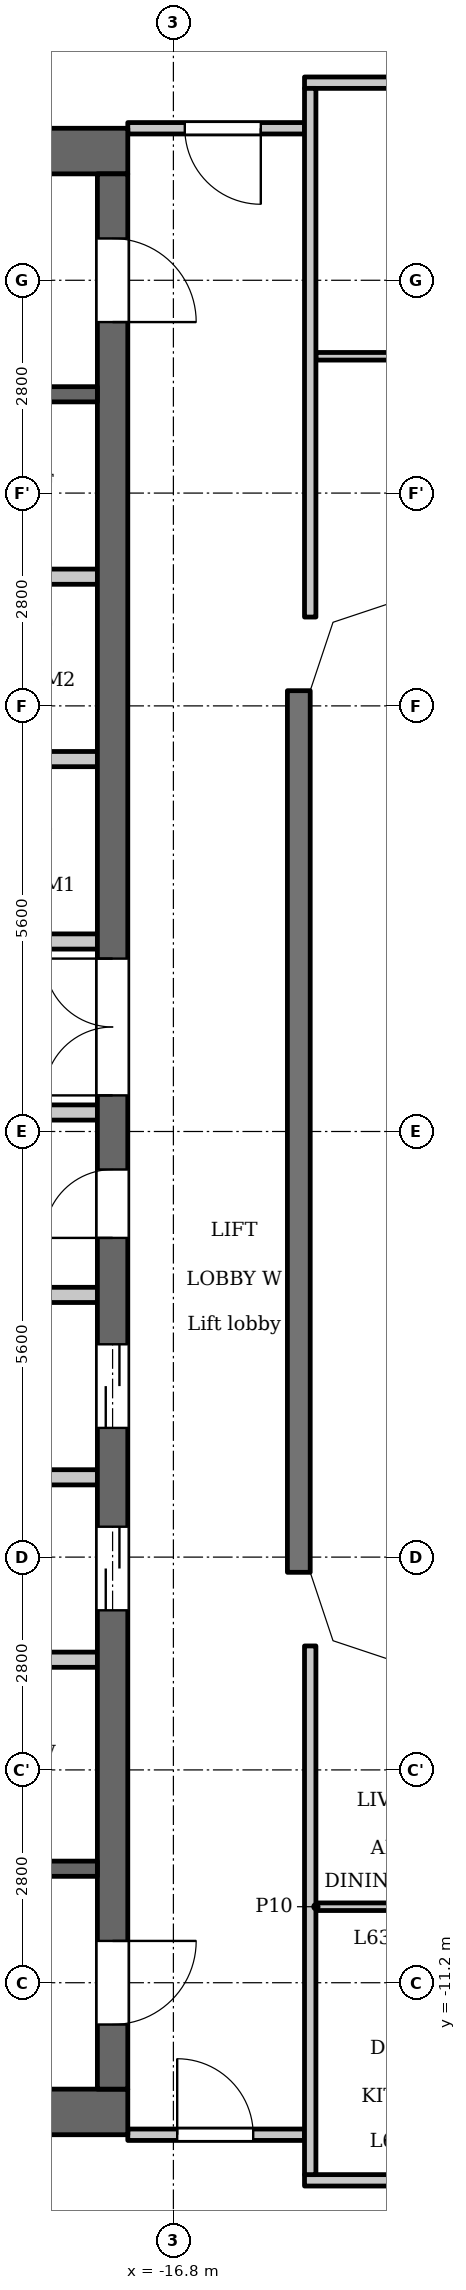
"""IFC4 building model, lengths in metres.
Left out: names, types, materials, properties, quantities, classifications, styles, units other than length and angle.
Written with IfcOpenShell. Run it as: python <this file> out.ifc"""

import sys

from ifc_helpers import new_model, si_unit, direction, frame, frame_2d, origin, place, context, subcontext, project, spatial, polyline, rectangle, outline, extrude, element, fill, save


model = new_model("IFC4")
c1 = context("Model", 3, precision=1e-05, world=origin(), true_north=direction((0.0, 1.0)))
c2 = subcontext(c1, "Body", "Model", "MODEL_VIEW")
j1 = project(units=[si_unit("LENGTHUNIT", "METRE"), si_unit("PLANEANGLEUNIT", "RADIAN")], contexts=[c1])
p1 = place(None, origin())
s1 = spatial("IfcSite", under=j1, at=p1, CompositionType="ELEMENT")
p2 = place(p1, origin())
s2 = spatial("IfcBuilding", under=s1, at=p2, CompositionType="ELEMENT")
p3 = place(p2, frame((0.0, 0.0, 245.2)))
s3 = spatial("IfcBuildingStorey", under=s2, at=p3, CompositionType="ELEMENT", Elevation=245.2)
p4 = place(p3, frame((-15.15, -5.8, 0.0), z_axis=(0.0, 0.0, 1.0), x_axis=(0.0, 1.0, 0.0)))
e1 = element("IfcWall", 1, at=p4, inside=s3, PredefinedType="SOLIDWALL", context=c2, shape_type="SweptSolid", body=[
    extrude(rectangle(XDim=11.6, YDim=0.3, at=frame_2d((5.8, 0.0))), origin(), (0.0, 0.0, 1.0), 3.2),
])
for number, where, z_axis, x_axis in (
    (2, (-17.4, 12.9, 0.0), (0.0, 0.0, 1.0), (-1.0, 0.0, 0.0)),
    (3, (-17.4, -12.9, 0.0), (0.0, 0.0, 1.0), (-1.0, 0.0, 0.0)),
):
    element("IfcWall", number, at=place(p3, frame(where, z_axis=z_axis, x_axis=x_axis)), inside=s3, PredefinedType="SHEAR", context=c2, shape_type="SweptSolid", body=[
        extrude(rectangle(XDim=7.32, YDim=0.6, at=frame_2d((3.66, 0.0))), origin(), (0.0, 0.0, 1.0), 3.2),
    ])
p5 = place(p3, frame((-17.6, -12.6, 0.0), z_axis=(0.0, 0.0, 1.0), x_axis=(0.0, 1.0, 0.0)))
e4 = element("IfcWall", 4, at=p5, inside=s3, PredefinedType="SHEAR", context=c2, shape_type="SweptSolid", body=[
    extrude(rectangle(XDim=25.2, YDim=0.4, at=frame_2d((12.6, 0.0))), origin(), (0.0, 0.0, 1.0), 3.2),
])
p6 = place(p5, frame((6.3, 0.0, 0.0)))
e5 = element("IfcOpeningElement", 5, at=p6, cuts=e4, PredefinedType="OPENING", context=c2, shape_type="SweptSolid", body=[
    extrude(rectangle(XDim=1.1, YDim=2.1, at=frame_2d((0.55, 1.05))), frame((0.0, 0.21, 0.0), z_axis=(0.0, -1.0, 0.0), x_axis=(1.0, 0.0, 0.0)), (0.0, 0.0, 1.0), 0.42),
])
p7 = place(p5, frame((8.7, 0.0, 0.0)))
e6 = element("IfcOpeningElement", 6, at=p7, cuts=e4, PredefinedType="OPENING", context=c2, shape_type="SweptSolid", body=[
    extrude(rectangle(XDim=1.1, YDim=2.1, at=frame_2d((0.55, 1.05))), frame((0.0, 0.21, 0.0), z_axis=(0.0, -1.0, 0.0), x_axis=(1.0, 0.0, 0.0)), (0.0, 0.0, 1.0), 0.42),
])
p8 = place(p5, frame((11.2, 0.0, 0.0)))
e7 = element("IfcOpeningElement", 7, at=p8, cuts=e4, PredefinedType="OPENING", context=c2, shape_type="SweptSolid", body=[
    extrude(rectangle(XDim=0.9, YDim=2.1, at=frame_2d((0.45, 1.05))), frame((0.0, 0.21, 0.0), z_axis=(0.0, -1.0, 0.0), x_axis=(1.0, 0.0, 0.0)), (0.0, 0.0, 1.0), 0.42),
])
p9 = place(p5, frame((23.25, 0.0, 0.0)))
e8 = element("IfcOpeningElement", 8, at=p9, cuts=e4, PredefinedType="OPENING", context=c2, shape_type="SweptSolid", body=[
    extrude(rectangle(XDim=1.1, YDim=2.1, at=frame_2d((0.55, 1.05))), frame((0.0, 0.21, 0.0), z_axis=(0.0, -1.0, 0.0), x_axis=(1.0, 0.0, 0.0)), (0.0, 0.0, 1.0), 0.42),
])
p10 = place(p5, frame((0.85, 0.0, 0.0)))
e9 = element("IfcOpeningElement", 9, at=p10, cuts=e4, PredefinedType="OPENING", context=c2, shape_type="SweptSolid", body=[
    extrude(rectangle(XDim=1.1, YDim=2.1, at=frame_2d((0.55, 1.05))), frame((0.0, 0.21, 0.0), z_axis=(0.0, -1.0, 0.0), x_axis=(1.0, 0.0, 0.0)), (0.0, 0.0, 1.0), 0.42),
])
p11 = place(p5, frame((13.075, 0.0, 0.0)))
e10 = element("IfcOpeningElement", 10, at=p11, cuts=e4, PredefinedType="OPENING", context=c2, shape_type="SweptSolid", body=[
    extrude(rectangle(XDim=1.8, YDim=2.1, at=frame_2d((0.9, 1.05))), frame((0.0, 0.21, 0.0), z_axis=(0.0, -1.0, 0.0), x_axis=(1.0, 0.0, 0.0)), (0.0, 0.0, 1.0), 0.42),
])
p12 = place(p3, frame((-17.8, -9.7, 0.0), z_axis=(0.0, 0.0, 1.0), x_axis=(-1.0, 0.0, 0.0)))
e11 = element("IfcWall", 11, at=p12, inside=s3, PredefinedType="SHEAR", context=c2, shape_type="SweptSolid", body=[
    extrude(rectangle(XDim=5.8, YDim=0.2, at=frame_2d((2.9, 0.0))), origin(), (0.0, 0.0, 1.0), 3.2),
])
p13 = place(p12, frame((0.85, 0.0, 0.0)))
e12 = element("IfcOpeningElement", 12, at=p13, cuts=e11, PredefinedType="OPENING", context=c2, shape_type="SweptSolid", body=[
    extrude(rectangle(XDim=1.1, YDim=2.1, at=frame_2d((0.55, 1.05))), frame((0.0, 0.11, 0.0), z_axis=(0.0, -1.0, 0.0), x_axis=(1.0, 0.0, 0.0)), (0.0, 0.0, 1.0), 0.22),
])
p14 = place(p12, frame((3.75, 0.0, 0.0)))
e13 = element("IfcOpeningElement", 13, at=p14, cuts=e11, PredefinedType="OPENING", context=c2, shape_type="SweptSolid", body=[
    extrude(rectangle(XDim=1.1, YDim=2.1, at=frame_2d((0.55, 1.05))), frame((0.0, 0.11, 0.0), z_axis=(0.0, -1.0, 0.0), x_axis=(1.0, 0.0, 0.0)), (0.0, 0.0, 1.0), 0.22),
])
for number, where, z_axis, x_axis in (
    (14, (-17.8, -6.95, 0.0), (0.0, 0.0, 1.0), (-1.0, 0.0, 0.0)),
    (15, (-17.8, -4.55, 0.0), (0.0, 0.0, 1.0), (-1.0, 0.0, 0.0)),
    (16, (-17.8, -2.15, 0.0), (0.0, 0.0, 1.0), (-1.0, 0.0, 0.0)),
):
    element("IfcWall", number, at=place(p3, frame(where, z_axis=z_axis, x_axis=x_axis)), inside=s3, PredefinedType="PARTITIONING", context=c2, shape_type="SweptSolid", body=[
        extrude(rectangle(XDim=2.8, YDim=0.2, at=frame_2d((1.4, 0.0))), origin(), (0.0, 0.0, 1.0), 3.2),
    ])
for number, where, z_axis, x_axis in (
    (17, (-17.8, 0.25, 0.0), (0.0, 0.0, 1.0), (-1.0, 0.0, 0.0)),
    (18, (-17.8, 2.5, 0.0), (0.0, 0.0, 1.0), (-1.0, 0.0, 0.0)),
):
    element("IfcWall", number, at=place(p3, frame(where, z_axis=z_axis, x_axis=x_axis)), inside=s3, PredefinedType="PARTITIONING", context=c2, shape_type="SweptSolid", body=[
        extrude(rectangle(XDim=3.0, YDim=0.2, at=frame_2d((1.5, 0.0))), origin(), (0.0, 0.0, 1.0), 3.2),
    ])
for number, where, z_axis, x_axis in (
    (19, (-17.8, 4.9, 0.0), (0.0, 0.0, 1.0), (-1.0, 0.0, 0.0)),
    (20, (-17.8, 7.3, 0.0), (0.0, 0.0, 1.0), (-1.0, 0.0, 0.0)),
):
    element("IfcWall", number, at=place(p3, frame(where, z_axis=z_axis, x_axis=x_axis)), inside=s3, PredefinedType="PARTITIONING", context=c2, shape_type="SweptSolid", body=[
        extrude(rectangle(XDim=2.8, YDim=0.2, at=frame_2d((1.4, 0.0))), origin(), (0.0, 0.0, 1.0), 3.2),
    ])
p15 = place(p3, frame((-17.8, 9.7, 0.0), z_axis=(0.0, 0.0, 1.0), x_axis=(-1.0, 0.0, 0.0)))
e21 = element("IfcWall", 21, at=p15, inside=s3, PredefinedType="SHEAR", context=c2, shape_type="SweptSolid", body=[
    extrude(rectangle(XDim=5.8, YDim=0.2, at=frame_2d((2.9, 0.0))), origin(), (0.0, 0.0, 1.0), 3.2),
])
p16 = place(p15, frame((0.85, 0.0, 0.0)))
e22 = element("IfcOpeningElement", 22, at=p16, cuts=e21, PredefinedType="OPENING", context=c2, shape_type="SweptSolid", body=[
    extrude(rectangle(XDim=1.1, YDim=2.1, at=frame_2d((0.55, 1.05))), frame((0.0, 0.11, 0.0), z_axis=(0.0, -1.0, 0.0), x_axis=(1.0, 0.0, 0.0)), (0.0, 0.0, 1.0), 0.22),
])
p17 = place(p15, frame((3.75, 0.0, 0.0)))
e23 = element("IfcOpeningElement", 23, at=p17, cuts=e21, PredefinedType="OPENING", context=c2, shape_type="SweptSolid", body=[
    extrude(rectangle(XDim=1.1, YDim=2.1, at=frame_2d((0.55, 1.05))), frame((0.0, 0.11, 0.0), z_axis=(0.0, -1.0, 0.0), x_axis=(1.0, 0.0, 0.0)), (0.0, 0.0, 1.0), 0.22),
])
p18 = place(p3, frame((-15.075, -13.8, 0.0), z_axis=(0.0, 0.0, 1.0), x_axis=(1.0, 0.0, 0.0)))
e24 = element("IfcWall", 24, at=p18, inside=s3, PredefinedType="PARTITIONING", context=c2, shape_type="SweptSolid", body=[
    extrude(rectangle(XDim=30.15, YDim=0.15, at=frame_2d((15.075, 0.0))), origin(), (0.0, 0.0, 1.0), 3.2),
])
p19 = place(p18, frame((2.225, 0.0, 0.0)))
e25 = element("IfcOpeningElement", 25, at=p19, cuts=e24, PredefinedType="OPENING", context=c2, shape_type="SweptSolid", body=[
    extrude(rectangle(XDim=1.0, YDim=2.1, at=frame_2d((0.5, 1.05))), frame((0.0, 0.085, 0.0), z_axis=(0.0, -1.0, 0.0), x_axis=(1.0, 0.0, 0.0)), (0.0, 0.0, 1.0), 0.17),
])
p20 = place(p18, frame((13.425, 0.0, 0.0)))
e26 = element("IfcOpeningElement", 26, at=p20, cuts=e24, PredefinedType="OPENING", context=c2, shape_type="SweptSolid", body=[
    extrude(rectangle(XDim=1.0, YDim=2.1, at=frame_2d((0.5, 1.05))), frame((0.0, 0.085, 0.0), z_axis=(0.0, -1.0, 0.0), x_axis=(1.0, 0.0, 0.0)), (0.0, 0.0, 1.0), 0.17),
])
p21 = place(p18, frame((24.625, 0.0, 0.0)))
e27 = element("IfcOpeningElement", 27, at=p21, cuts=e24, PredefinedType="OPENING", context=c2, shape_type="SweptSolid", body=[
    extrude(rectangle(XDim=1.0, YDim=2.1, at=frame_2d((0.5, 1.05))), frame((0.0, 0.085, 0.0), z_axis=(0.0, -1.0, 0.0), x_axis=(1.0, 0.0, 0.0)), (0.0, 0.0, 1.0), 0.17),
])
p22 = place(p3, frame((-17.4, -13.2, 0.0), z_axis=(0.0, 0.0, 1.0), x_axis=(1.0, 0.0, 0.0)))
e28 = element("IfcWall", 28, at=p22, inside=s3, PredefinedType="PARTITIONING", context=c2, shape_type="SweptSolid", body=[
    extrude(rectangle(XDim=2.325, YDim=0.15, at=frame_2d((1.163, 0.0))), origin(), (0.0, 0.0, 1.0), 3.2),
])
p23 = place(p22, frame((0.65, 0.0, 0.0)))
e29 = element("IfcOpeningElement", 29, at=p23, cuts=e28, PredefinedType="OPENING", context=c2, shape_type="SweptSolid", body=[
    extrude(rectangle(XDim=1.0, YDim=2.1, at=frame_2d((0.5, 1.05))), frame((0.0, 0.085, 0.0), z_axis=(0.0, -1.0, 0.0), x_axis=(1.0, 0.0, 0.0)), (0.0, 0.0, 1.0), 0.17),
])
p24 = place(p3, frame((-14.925, -10.2, 0.0), z_axis=(0.0, 0.0, 1.0), x_axis=(1.0, 0.0, 0.0)))
e30 = element("IfcWall", 30, at=p24, inside=s3, PredefinedType="PARTITIONING", context=c2, shape_type="SweptSolid", body=[
    extrude(rectangle(XDim=29.85, YDim=0.1, at=frame_2d((14.925, 0.0))), origin(), (0.0, 0.0, 1.0), 3.2),
])
p25 = place(p24, frame((7.875, 0.0, 0.0)))
e31 = element("IfcOpeningElement", 31, at=p25, cuts=e30, PredefinedType="OPENING", context=c2, shape_type="SweptSolid", body=[
    extrude(rectangle(XDim=0.8, YDim=2.1, at=frame_2d((0.4, 1.05))), frame((0.0, 0.06, 0.0), z_axis=(0.0, -1.0, 0.0), x_axis=(1.0, 0.0, 0.0)), (0.0, 0.0, 1.0), 0.12),
])
p26 = place(p24, frame((2.175, 0.0, 0.0)))
e32 = element("IfcOpeningElement", 32, at=p26, cuts=e30, PredefinedType="OPENING", context=c2, shape_type="SweptSolid", body=[
    extrude(rectangle(XDim=0.9, YDim=2.1, at=frame_2d((0.45, 1.05))), frame((0.0, 0.06, 0.0), z_axis=(0.0, -1.0, 0.0), x_axis=(1.0, 0.0, 0.0)), (0.0, 0.0, 1.0), 0.12),
])
p27 = place(p24, frame((19.075, 0.0, 0.0)))
e33 = element("IfcOpeningElement", 33, at=p27, cuts=e30, PredefinedType="OPENING", context=c2, shape_type="SweptSolid", body=[
    extrude(rectangle(XDim=0.8, YDim=2.1, at=frame_2d((0.4, 1.05))), frame((0.0, 0.06, 0.0), z_axis=(0.0, -1.0, 0.0), x_axis=(1.0, 0.0, 0.0)), (0.0, 0.0, 1.0), 0.12),
])
p28 = place(p24, frame((13.375, 0.0, 0.0)))
e34 = element("IfcOpeningElement", 34, at=p28, cuts=e30, PredefinedType="OPENING", context=c2, shape_type="SweptSolid", body=[
    extrude(rectangle(XDim=0.9, YDim=2.1, at=frame_2d((0.45, 1.05))), frame((0.0, 0.06, 0.0), z_axis=(0.0, -1.0, 0.0), x_axis=(1.0, 0.0, 0.0)), (0.0, 0.0, 1.0), 0.12),
])
p29 = place(p24, frame((28.525, 0.0, 0.0)))
e35 = element("IfcOpeningElement", 35, at=p29, cuts=e30, PredefinedType="OPENING", context=c2, shape_type="SweptSolid", body=[
    extrude(rectangle(XDim=0.8, YDim=2.1, at=frame_2d((0.4, 1.05))), frame((0.0, 0.06, 0.0), z_axis=(0.0, -1.0, 0.0), x_axis=(1.0, 0.0, 0.0)), (0.0, 0.0, 1.0), 0.12),
])
p30 = place(p24, frame((24.575, 0.0, 0.0)))
e36 = element("IfcOpeningElement", 36, at=p30, cuts=e30, PredefinedType="OPENING", context=c2, shape_type="SweptSolid", body=[
    extrude(rectangle(XDim=0.9, YDim=2.1, at=frame_2d((0.45, 1.05))), frame((0.0, 0.06, 0.0), z_axis=(0.0, -1.0, 0.0), x_axis=(1.0, 0.0, 0.0)), (0.0, 0.0, 1.0), 0.12),
])
p31 = place(p3, frame((-14.925, 10.2, 0.0), z_axis=(0.0, 0.0, 1.0), x_axis=(1.0, 0.0, 0.0)))
e37 = element("IfcWall", 37, at=p31, inside=s3, PredefinedType="PARTITIONING", context=c2, shape_type="SweptSolid", body=[
    extrude(rectangle(XDim=29.85, YDim=0.1, at=frame_2d((14.925, 0.0))), origin(), (0.0, 0.0, 1.0), 3.2),
])
p32 = place(p31, frame((13.475, 0.0, 0.0)))
e38 = element("IfcOpeningElement", 38, at=p32, cuts=e37, PredefinedType="OPENING", context=c2, shape_type="SweptSolid", body=[
    extrude(rectangle(XDim=0.9, YDim=2.1, at=frame_2d((0.45, 1.05))), frame((0.0, 0.06, 0.0), z_axis=(0.0, -1.0, 0.0), x_axis=(1.0, 0.0, 0.0)), (0.0, 0.0, 1.0), 0.12),
])
p33 = place(p31, frame((4.375, 0.0, 0.0)))
e39 = element("IfcOpeningElement", 39, at=p33, cuts=e37, PredefinedType="OPENING", context=c2, shape_type="SweptSolid", body=[
    extrude(rectangle(XDim=0.9, YDim=2.1, at=frame_2d((0.45, 1.05))), frame((0.0, 0.06, 0.0), z_axis=(0.0, -1.0, 0.0), x_axis=(1.0, 0.0, 0.0)), (0.0, 0.0, 1.0), 0.12),
])
p34 = place(p31, frame((15.475, 0.0, 0.0)))
e40 = element("IfcOpeningElement", 40, at=p34, cuts=e37, PredefinedType="OPENING", context=c2, shape_type="SweptSolid", body=[
    extrude(rectangle(XDim=0.8, YDim=2.1, at=frame_2d((0.4, 1.05))), frame((0.0, 0.06, 0.0), z_axis=(0.0, -1.0, 0.0), x_axis=(1.0, 0.0, 0.0)), (0.0, 0.0, 1.0), 0.12),
])
p35 = place(p31, frame((18.825, 0.0, 0.0)))
e41 = element("IfcOpeningElement", 41, at=p35, cuts=e37, PredefinedType="OPENING", context=c2, shape_type="SweptSolid", body=[
    extrude(rectangle(XDim=0.9, YDim=2.1, at=frame_2d((0.45, 1.05))), frame((0.0, 0.06, 0.0), z_axis=(0.0, -1.0, 0.0), x_axis=(1.0, 0.0, 0.0)), (0.0, 0.0, 1.0), 0.12),
])
p36 = place(p31, frame((28.474, 0.0, 0.0)))
e42 = element("IfcOpeningElement", 42, at=p36, cuts=e37, PredefinedType="OPENING", context=c2, shape_type="SweptSolid", body=[
    extrude(rectangle(XDim=0.8, YDim=2.1, at=frame_2d((0.4, 1.05))), frame((0.0, 0.06, 0.0), z_axis=(0.0, -1.0, 0.0), x_axis=(1.0, 0.0, 0.0)), (0.0, 0.0, 1.0), 0.12),
])
p37 = place(p31, frame((24.675, 0.0, 0.0)))
e43 = element("IfcOpeningElement", 43, at=p37, cuts=e37, PredefinedType="OPENING", context=c2, shape_type="SweptSolid", body=[
    extrude(rectangle(XDim=0.9, YDim=2.1, at=frame_2d((0.45, 1.05))), frame((0.0, 0.06, 0.0), z_axis=(0.0, -1.0, 0.0), x_axis=(1.0, 0.0, 0.0)), (0.0, 0.0, 1.0), 0.12),
])
p38 = place(p3, frame((-17.4, 13.2, 0.0), z_axis=(0.0, 0.0, 1.0), x_axis=(1.0, 0.0, 0.0)))
e44 = element("IfcWall", 44, at=p38, inside=s3, PredefinedType="PARTITIONING", context=c2, shape_type="SweptSolid", body=[
    extrude(rectangle(XDim=2.325, YDim=0.15, at=frame_2d((1.163, 0.0))), origin(), (0.0, 0.0, 1.0), 3.2),
])
p39 = place(p38, frame((0.75, 0.0, 0.0)))
e45 = element("IfcOpeningElement", 45, at=p39, cuts=e44, PredefinedType="OPENING", context=c2, shape_type="SweptSolid", body=[
    extrude(rectangle(XDim=1.0, YDim=2.1, at=frame_2d((0.5, 1.05))), frame((0.0, 0.085, 0.0), z_axis=(0.0, -1.0, 0.0), x_axis=(1.0, 0.0, 0.0)), (0.0, 0.0, 1.0), 0.17),
])
p40 = place(p3, frame((-15.075, 13.8, 0.0), z_axis=(0.0, 0.0, 1.0), x_axis=(1.0, 0.0, 0.0)))
e46 = element("IfcWall", 46, at=p40, inside=s3, PredefinedType="PARTITIONING", context=c2, shape_type="SweptSolid", body=[
    extrude(rectangle(XDim=30.15, YDim=0.15, at=frame_2d((15.075, 0.0))), origin(), (0.0, 0.0, 1.0), 3.2),
])
p41 = place(p40, frame((10.125, 0.0, 0.0)))
e47 = element("IfcOpeningElement", 47, at=p41, cuts=e46, PredefinedType="OPENING", context=c2, shape_type="SweptSolid", body=[
    extrude(rectangle(XDim=1.0, YDim=2.1, at=frame_2d((0.5, 1.05))), frame((0.0, 0.085, 0.0), z_axis=(0.0, -1.0, 0.0), x_axis=(1.0, 0.0, 0.0)), (0.0, 0.0, 1.0), 0.17),
])
p42 = place(p40, frame((18.975, 0.0, 0.0)))
e48 = element("IfcOpeningElement", 48, at=p42, cuts=e46, PredefinedType="OPENING", context=c2, shape_type="SweptSolid", body=[
    extrude(rectangle(XDim=1.0, YDim=2.1, at=frame_2d((0.5, 1.05))), frame((0.0, 0.085, 0.0), z_axis=(0.0, -1.0, 0.0), x_axis=(1.0, 0.0, 0.0)), (0.0, 0.0, 1.0), 0.17),
])
p43 = place(p40, frame((24.575, 0.0, 0.0)))
e49 = element("IfcOpeningElement", 49, at=p43, cuts=e46, PredefinedType="OPENING", context=c2, shape_type="SweptSolid", body=[
    extrude(rectangle(XDim=1.0, YDim=2.1, at=frame_2d((0.5, 1.05))), frame((0.0, 0.085, 0.0), z_axis=(0.0, -1.0, 0.0), x_axis=(1.0, 0.0, 0.0)), (0.0, 0.0, 1.0), 0.17),
])
for number, where, z_axis, x_axis in (
    (50, (-15.0, -13.725, 0.0), (0.0, 0.0, 1.0), (0.0, 1.0, 0.0)),
    (51, (-15.0, 6.769, 0.0), (0.0, 0.0, 1.0), (0.0, 1.0, 0.0)),
):
    element("IfcWall", number, at=place(p3, frame(where, z_axis=z_axis, x_axis=x_axis)), inside=s3, PredefinedType="PARTITIONING", context=c2, shape_type="SweptSolid", body=[
        extrude(rectangle(XDim=6.956, YDim=0.15, at=frame_2d((3.478, 0.0))), origin(), (0.0, 0.0, 1.0), 3.2),
    ])
p44 = place(p3, origin())
e52 = element("IfcWall", 52, at=p44, inside=s3, PredefinedType="SOLIDWALL", context=c2, shape_type="SweptSolid", body=[
    extrude(outline(polyline([(-13.849, 7.3), (-14.937, 6.937), (-15.3, 5.849), (-15.3, 5.8), (-15.0, 5.8), (-14.7, 6.7), (-13.8, 7.0), (-13.8, 7.3), (-13.849, 7.3)])), origin(), (0.0, 0.0, 1.0), 3.2),
])
e53 = element("IfcWall", 53, at=p44, inside=s3, PredefinedType="SOLIDWALL", context=c2, shape_type="SweptSolid", body=[
    extrude(outline(polyline([(-14.937, -6.937), (-13.849, -7.3), (-13.8, -7.3), (-13.8, -7.0), (-14.7, -6.7), (-15.0, -5.8), (-15.3, -5.8), (-15.3, -5.849), (-14.937, -6.937)])), origin(), (0.0, 0.0, 1.0), 3.2),
])
p45 = place(p6, origin())
e54 = element("IfcDoor", 54, at=p45, inside=s3, OperationType="DOUBLE_DOOR_SLIDING", PredefinedType="DOOR", context=c2, shape_type="SweptSolid", body=[
    extrude(rectangle(XDim=1.1, YDim=2.1, at=frame_2d((0.55, 1.05))), frame((0.0, 0.025, 0.0), z_axis=(0.0, -1.0, 0.0), x_axis=(1.0, 0.0, 0.0)), (0.0, 0.0, 1.0), 0.05),
])
fill(e5, e54)
p46 = place(p7, origin())
e55 = element("IfcDoor", 55, at=p46, inside=s3, OperationType="DOUBLE_DOOR_SLIDING", PredefinedType="DOOR", context=c2, shape_type="SweptSolid", body=[
    extrude(rectangle(XDim=1.1, YDim=2.1, at=frame_2d((0.55, 1.05))), frame((0.0, 0.025, 0.0), z_axis=(0.0, -1.0, 0.0), x_axis=(1.0, 0.0, 0.0)), (0.0, 0.0, 1.0), 0.05),
])
fill(e6, e55)
p47 = place(p8, origin())
e56 = element("IfcDoor", 56, at=p47, inside=s3, OperationType="SINGLE_SWING_RIGHT", PredefinedType="DOOR", context=c2, shape_type="SweptSolid", body=[
    extrude(rectangle(XDim=0.9, YDim=2.1, at=frame_2d((0.45, 1.05))), frame((0.0, 0.025, 0.0), z_axis=(0.0, -1.0, 0.0), x_axis=(1.0, 0.0, 0.0)), (0.0, 0.0, 1.0), 0.05),
])
fill(e7, e56)
p48 = place(p9, origin())
e57 = element("IfcDoor", 57, at=p48, inside=s3, OperationType="SINGLE_SWING_LEFT", PredefinedType="DOOR", context=c2, shape_type="SweptSolid", body=[
    extrude(rectangle(XDim=1.1, YDim=2.1, at=frame_2d((0.55, 1.05))), frame((0.0, 0.025, 0.0), z_axis=(0.0, -1.0, 0.0), x_axis=(1.0, 0.0, 0.0)), (0.0, 0.0, 1.0), 0.05),
])
fill(e8, e57)
p49 = place(p10, origin())
e58 = element("IfcDoor", 58, at=p49, inside=s3, OperationType="SINGLE_SWING_RIGHT", PredefinedType="DOOR", context=c2, shape_type="SweptSolid", body=[
    extrude(rectangle(XDim=1.1, YDim=2.1, at=frame_2d((0.55, 1.05))), frame((0.0, 0.025, 0.0), z_axis=(0.0, -1.0, 0.0), x_axis=(1.0, 0.0, 0.0)), (0.0, 0.0, 1.0), 0.05),
])
fill(e9, e58)
p50 = place(p11, origin())
e59 = element("IfcDoor", 59, at=p50, inside=s3, OperationType="DOUBLE_DOOR_SINGLE_SWING", PredefinedType="DOOR", context=c2, shape_type="SweptSolid", body=[
    extrude(rectangle(XDim=1.8, YDim=2.1, at=frame_2d((0.9, 1.05))), frame((0.0, 0.025, 0.0), z_axis=(0.0, -1.0, 0.0), x_axis=(1.0, 0.0, 0.0)), (0.0, 0.0, 1.0), 0.05),
])
fill(e10, e59)
p51 = place(p39, origin())
e60 = element("IfcDoor", 60, at=p51, inside=s3, OperationType="SINGLE_SWING_RIGHT", PredefinedType="DOOR", context=c2, shape_type="SweptSolid", body=[
    extrude(rectangle(XDim=1.0, YDim=2.1, at=frame_2d((0.5, 1.05))), frame((0.0, 0.025, 0.0), z_axis=(0.0, -1.0, 0.0), x_axis=(1.0, 0.0, 0.0)), (0.0, 0.0, 1.0), 0.05),
])
fill(e45, e60)
p52 = place(p23, origin())
e61 = element("IfcDoor", 61, at=p52, inside=s3, OperationType="SINGLE_SWING_RIGHT", PredefinedType="DOOR", context=c2, shape_type="SweptSolid", body=[
    extrude(rectangle(XDim=1.0, YDim=2.1, at=frame_2d((0.5, 1.05))), frame((0.0, 0.025, 0.0), z_axis=(0.0, -1.0, 0.0), x_axis=(1.0, 0.0, 0.0)), (0.0, 0.0, 1.0), 0.05),
])
fill(e29, e61)
save(model, sys.argv[1])
